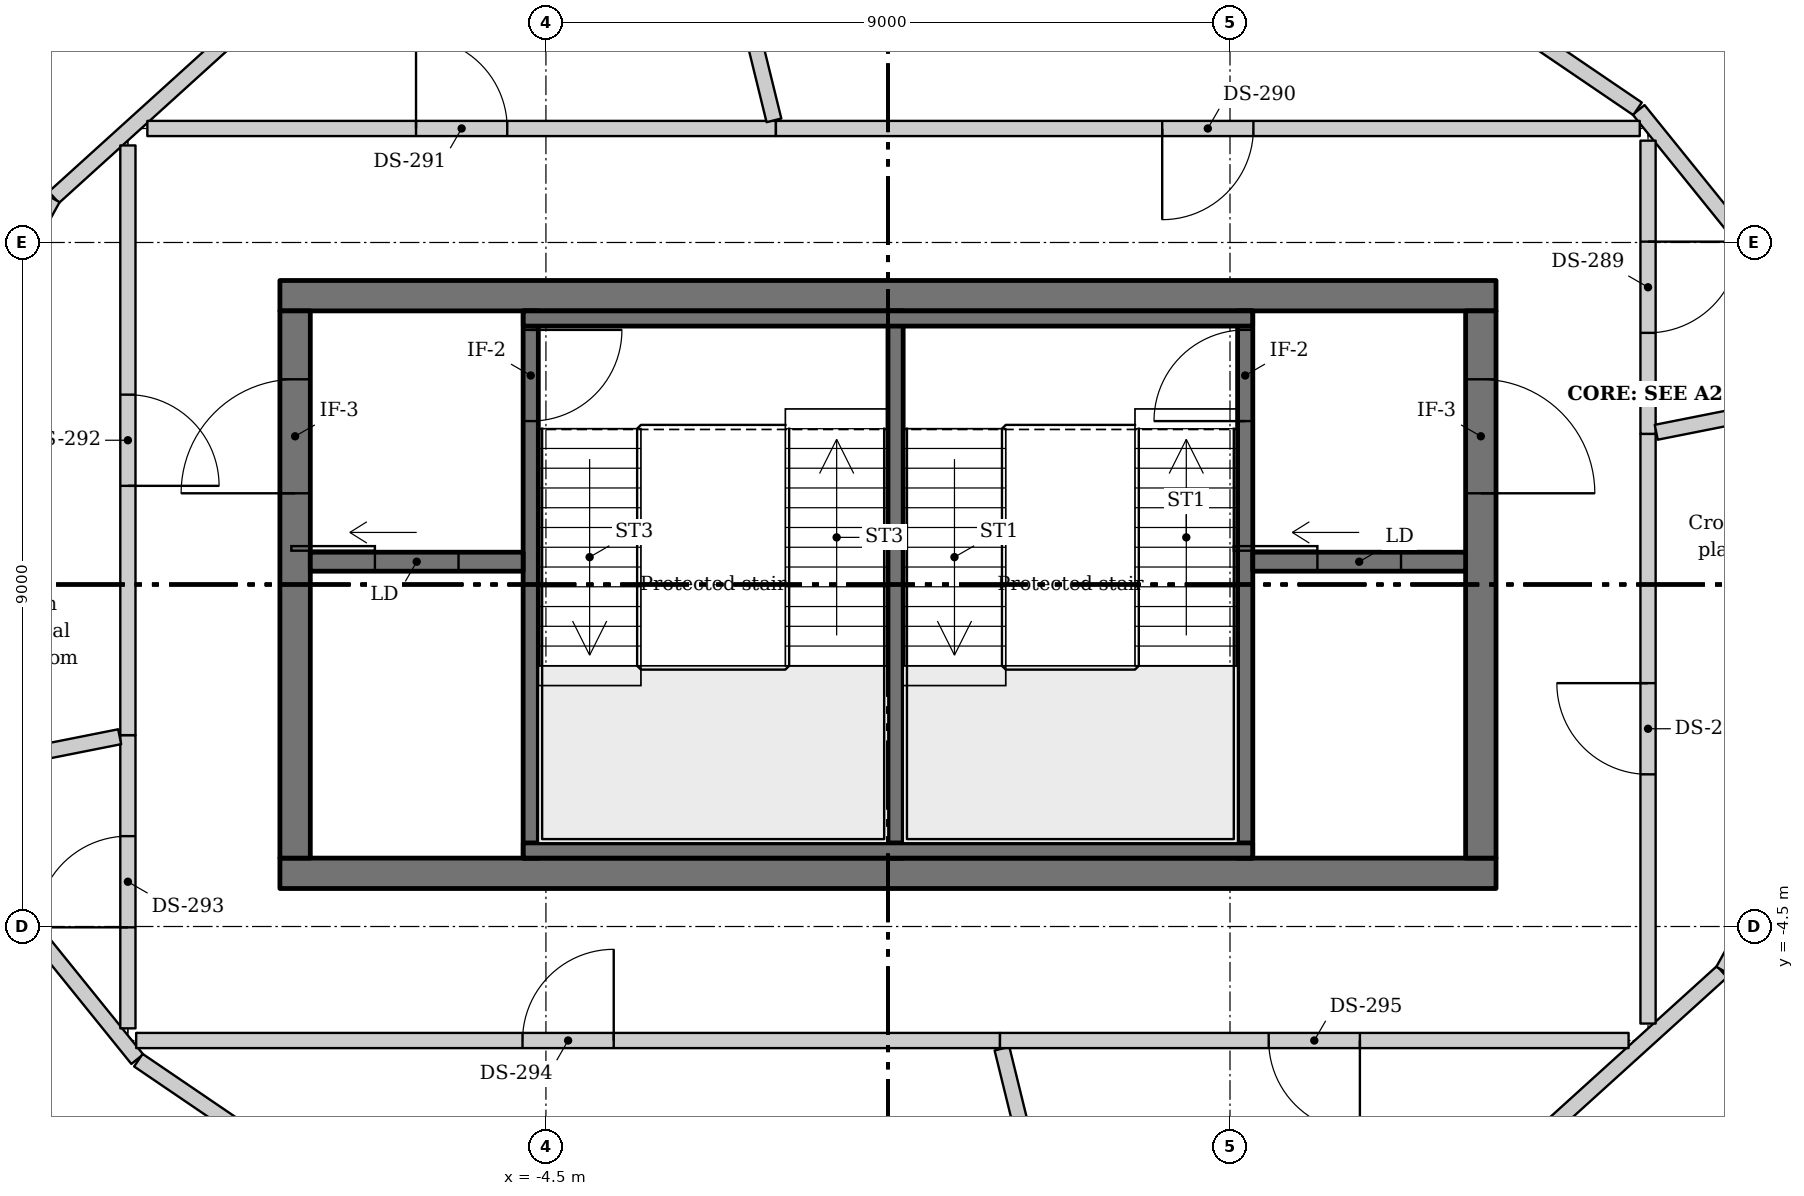
"""IFC4 building model, lengths in metres.
Left out: names, types, materials, properties, quantities, classifications, styles, units other than length and angle.
Written with IfcOpenShell. Run it as: python <this file> out.ifc"""

import sys

from ifc_helpers import new_model, si_unit, direction, frame, frame_2d, origin, place, context, subcontext, project, spatial, rectangle, extrude, source, transform, mapped, element, fill, save


model = new_model("IFC4")
c1 = context("Model", 3, precision=1e-05, world=origin(), true_north=direction((0.0, 1.0)))
c2 = subcontext(c1, "Body", "Model", "MODEL_VIEW")
j1 = project(units=[si_unit("LENGTHUNIT", "METRE"), si_unit("PLANEANGLEUNIT", "RADIAN")], contexts=[c1])
p1 = place(None, origin())
s1 = spatial("IfcSite", under=j1, at=p1, CompositionType="ELEMENT")
p2 = place(p1, origin())
s2 = spatial("IfcBuilding", under=s1, at=p2, CompositionType="ELEMENT")
p3 = place(p2, frame((0.0, 0.0, 365.5)))
s3 = spatial("IfcBuildingStorey", under=s2, at=p3, CompositionType="ELEMENT", Elevation=365.5)
m1 = source(origin(), c2, "Body", "SweptSolid", [
    extrude(rectangle(XDim=16.0, YDim=0.4, at=frame_2d((8.0, 0.0))), origin(), (0.0, 0.0, 1.0), 4.5),
])
for number, where, z_axis, x_axis in (
    (1, (-8.0, 3.8, -0.25), (0.0, 0.0, 1.0), (1.0, 0.0, 0.0)),
    (2, (-8.0, -3.8, -0.25), (0.0, 0.0, 1.0), (1.0, 0.0, 0.0)),
):
    element("IfcWall", number, at=place(p3, frame(where, z_axis=z_axis, x_axis=x_axis)), inside=s3, PredefinedType="SHEAR", context=c2, shape_type="MappedRepresentation", body=[
        mapped(m1, transform((0.0, 0.0, 0.0))),
    ])
m2 = source(origin(), c2, "Body", "SweptSolid", [
    extrude(rectangle(XDim=7.2, YDim=0.4, at=frame_2d((3.6, 0.0))), origin(), (0.0, 0.0, 1.0), 4.5),
])
p4 = place(p3, frame((7.8, -3.6, -0.25), z_axis=(0.0, 0.0, 1.0), x_axis=(0.0, 1.0, 0.0)))
e3 = element("IfcWall", 3, at=p4, inside=s3, PredefinedType="SHEAR", context=c2, shape_type="MappedRepresentation", body=[
    mapped(m2, transform((0.0, 0.0, 0.0))),
])
m3 = source(origin(), c2, "Body", "SweptSolid", [
    extrude(rectangle(XDim=1.5, YDim=2.1, at=frame_2d((0.75, 1.05))), frame((0.0, 0.21, 0.0), z_axis=(0.0, -1.0, 0.0), x_axis=(1.0, 0.0, 0.0)), (0.0, 0.0, 1.0), 0.42),
])
p5 = place(p4, frame((4.8, 0.0, 0.25)))
e4 = element("IfcOpeningElement", 4, at=p5, cuts=e3, PredefinedType="OPENING", context=c2, shape_type="MappedRepresentation", body=[
    mapped(m3, transform((0.0, 0.0, 0.0))),
])
p6 = place(p3, frame((-7.8, -3.6, -0.25), z_axis=(0.0, 0.0, 1.0), x_axis=(0.0, 1.0, 0.0)))
e5 = element("IfcWall", 5, at=p6, inside=s3, PredefinedType="SHEAR", context=c2, shape_type="MappedRepresentation", body=[
    mapped(m2, transform((0.0, 0.0, 0.0))),
])
p7 = place(p6, frame((4.8, 0.0, 0.25)))
e6 = element("IfcOpeningElement", 6, at=p7, cuts=e5, PredefinedType="OPENING", context=c2, shape_type="MappedRepresentation", body=[
    mapped(m3, transform((0.0, 0.0, 0.0))),
])
m4 = source(origin(), c2, "Body", "SweptSolid", [
    extrude(rectangle(XDim=3.175, YDim=0.2, at=frame_2d((1.587, 0.0))), origin(), (0.0, 0.0, 1.0), 4.25),
])
p8 = place(p3, frame((9.876, 6.246, 0.0), z_axis=(0.0, 0.0, 1.0), x_axis=(0.628308465475, -0.777964312943, 0.0)))
e7 = element("IfcWall", 7, at=p8, inside=s3, PredefinedType="SOLIDWALL", context=c2, shape_type="MappedRepresentation", body=[
    mapped(m4, transform((0.0, 0.0, 0.0))),
])
m5 = source(origin(), c2, "Body", "SweptSolid", [
    extrude(rectangle(XDim=3.23, YDim=0.2, at=frame_2d((1.615, 0.0))), origin(), (0.0, 0.0, 1.0), 4.25),
])
p9 = place(p3, frame((7.191, 8.076, 0.0), z_axis=(0.0, 0.0, 1.0), x_axis=(0.826887140507, -0.562367901701, 0.0)))
e8 = element("IfcWall", 8, at=p9, inside=s3, PredefinedType="SOLIDWALL", context=c2, shape_type="MappedRepresentation", body=[
    mapped(m5, transform((0.0, 0.0, 0.0))),
])
m6 = source(origin(), c2, "Body", "SweptSolid", [
    extrude(rectangle(XDim=3.205, YDim=0.2, at=frame_2d((1.603, 0.0))), origin(), (0.0, 0.0, 1.0), 4.25),
])
p10 = place(p3, frame((-10.974, 5.094, 0.0), z_axis=(0.0, 0.0, 1.0), x_axis=(0.741131432131, 0.671359963289, 0.0)))
e9 = element("IfcWall", 9, at=p10, inside=s3, PredefinedType="SOLIDWALL", context=c2, shape_type="MappedRepresentation", body=[
    mapped(m6, transform((0.0, 0.0, 0.0))),
])
m7 = source(origin(), c2, "Body", "SweptSolid", [
    extrude(rectangle(XDim=3.142, YDim=0.2, at=frame_2d((1.571, 0.0))), origin(), (0.0, 0.0, 1.0), 4.25),
])
p11 = place(p3, frame((-12.506, 2.329, 0.0), z_axis=(0.0, 0.0, 1.0), x_axis=(0.48375502956, 0.875203445706, 0.0)))
e10 = element("IfcWall", 10, at=p11, inside=s3, PredefinedType="SOLIDWALL", context=c2, shape_type="MappedRepresentation", body=[
    mapped(m7, transform((0.0, 0.0, 0.0))),
])
p12 = place(p3, frame((-9.876, -6.246, 0.0), z_axis=(0.0, 0.0, 1.0), x_axis=(-0.628308465475, 0.777964312943, 0.0)))
e11 = element("IfcWall", 11, at=p12, inside=s3, PredefinedType="SOLIDWALL", context=c2, shape_type="MappedRepresentation", body=[
    mapped(m4, transform((0.0, 0.0, 0.0))),
])
p13 = place(p3, frame((-7.191, -8.076, 0.0), z_axis=(0.0, 0.0, 1.0), x_axis=(-0.826887140507, 0.562367901701, 0.0)))
e12 = element("IfcWall", 12, at=p13, inside=s3, PredefinedType="SOLIDWALL", context=c2, shape_type="MappedRepresentation", body=[
    mapped(m5, transform((0.0, 0.0, 0.0))),
])
p14 = place(p3, frame((10.974, -5.094, 0.0), z_axis=(0.0, 0.0, 1.0), x_axis=(-0.741131432131, -0.671359963289, 0.0)))
e13 = element("IfcWall", 13, at=p14, inside=s3, PredefinedType="SOLIDWALL", context=c2, shape_type="MappedRepresentation", body=[
    mapped(m6, transform((0.0, 0.0, 0.0))),
])
p15 = place(p3, frame((12.506, -2.329, 0.0), z_axis=(0.0, 0.0, 1.0), x_axis=(-0.48375502956, -0.875203445706, 0.0)))
e14 = element("IfcWall", 14, at=p15, inside=s3, PredefinedType="SOLIDWALL", context=c2, shape_type="MappedRepresentation", body=[
    mapped(m7, transform((0.0, 0.0, 0.0))),
])
m8 = source(origin(), c2, "Body", "SweptSolid", [
    extrude(rectangle(XDim=7.2, YDim=0.2, at=frame_2d((3.6, 0.0))), origin(), (0.0, 0.0, 1.0), 4.25),
])
p16 = place(p3, frame((0.1, 3.6, 0.0), z_axis=(0.0, 0.0, 1.0), x_axis=(0.0, -1.0, 0.0)))
e15 = element("IfcWall", 15, at=p16, inside=s3, PredefinedType="SHEAR", context=c2, shape_type="MappedRepresentation", body=[
    mapped(m8, transform((0.0, 0.0, 0.0))),
])
p17 = place(p3, frame((4.7, -3.6, 0.0), z_axis=(0.0, 0.0, 1.0), x_axis=(0.0, 1.0, 0.0)))
e16 = element("IfcWall", 16, at=p17, inside=s3, PredefinedType="SHEAR", context=c2, shape_type="MappedRepresentation", body=[
    mapped(m8, transform((0.0, 0.0, 0.0))),
])
m9 = source(origin(), c2, "Body", "SweptSolid", [
    extrude(rectangle(XDim=1.2, YDim=2.1, at=frame_2d((0.6, 1.05))), frame((0.0, 0.11, 0.0), z_axis=(0.0, -1.0, 0.0), x_axis=(1.0, 0.0, 0.0)), (0.0, 0.0, 1.0), 0.22),
])
p18 = place(p17, frame((5.75, 0.0, 0.0)))
e17 = element("IfcOpeningElement", 17, at=p18, cuts=e16, PredefinedType="OPENING", context=c2, shape_type="MappedRepresentation", body=[
    mapped(m9, transform((0.0, 0.0, 0.0))),
])
p19 = place(p3, frame((-4.7, 3.6, 0.0), z_axis=(0.0, 0.0, 1.0), x_axis=(0.0, -1.0, 0.0)))
e18 = element("IfcWall", 18, at=p19, inside=s3, PredefinedType="SHEAR", context=c2, shape_type="MappedRepresentation", body=[
    mapped(m8, transform((0.0, 0.0, 0.0))),
])
p20 = place(p19, frame((0.25, 0.0, 0.0)))
e19 = element("IfcOpeningElement", 19, at=p20, cuts=e18, PredefinedType="OPENING", context=c2, shape_type="MappedRepresentation", body=[
    mapped(m9, transform((0.0, 0.0, 0.0))),
])
m10 = source(origin(), c2, "Body", "SweptSolid", [
    extrude(rectangle(XDim=2.8, YDim=0.25, at=frame_2d((1.4, 0.0))), origin(), (0.0, 0.0, 1.0), 4.25),
])
p21 = place(p3, frame((7.6, 0.3, 0.0), z_axis=(0.0, 0.0, 1.0), x_axis=(-1.0, 0.0, 0.0)))
e20 = element("IfcWall", 20, at=p21, inside=s3, PredefinedType="SHEAR", context=c2, shape_type="MappedRepresentation", body=[
    mapped(m10, transform((0.0, 0.0, 0.0))),
])
m11 = source(origin(), c2, "Body", "SweptSolid", [
    extrude(rectangle(XDim=1.1, YDim=2.1, at=frame_2d((0.55, 1.05))), frame((0.0, 0.135, 0.0), z_axis=(0.0, -1.0, 0.0), x_axis=(1.0, 0.0, 0.0)), (0.0, 0.0, 1.0), 0.27),
])
p22 = place(p21, frame((0.85, 0.0, 0.0)))
e21 = element("IfcOpeningElement", 21, at=p22, cuts=e20, PredefinedType="OPENING", context=c2, shape_type="MappedRepresentation", body=[
    mapped(m11, transform((0.0, 0.0, 0.0))),
])
p23 = place(p3, frame((-4.8, 0.3, 0.0), z_axis=(0.0, 0.0, 1.0), x_axis=(-1.0, 0.0, 0.0)))
e22 = element("IfcWall", 22, at=p23, inside=s3, PredefinedType="SHEAR", context=c2, shape_type="MappedRepresentation", body=[
    mapped(m10, transform((0.0, 0.0, 0.0))),
])
p24 = place(p23, frame((0.85, 0.0, 0.0)))
e23 = element("IfcOpeningElement", 23, at=p24, cuts=e22, PredefinedType="OPENING", context=c2, shape_type="MappedRepresentation", body=[
    mapped(m11, transform((0.0, 0.0, 0.0))),
])
m12 = source(origin(), c2, "Body", "SweptSolid", [
    extrude(rectangle(XDim=9.596, YDim=0.2, at=frame_2d((4.798, 0.0))), origin(), (0.0, 0.0, 1.0), 4.25),
])
for number, where, z_axis, x_axis in (
    (24, (-4.798, -3.5, 0.0), (0.0, 0.0, 1.0), (1.0, 0.0, 0.0)),
    (25, (4.798, 3.5, 0.0), (0.0, 0.0, 1.0), (-1.0, 0.0, 0.0)),
):
    element("IfcWall", number, at=place(p3, frame(where, z_axis=z_axis, x_axis=x_axis)), inside=s3, PredefinedType="SHEAR", context=c2, shape_type="MappedRepresentation", body=[
        mapped(m12, transform((0.0, 0.0, 0.0))),
    ])
m13 = source(origin(), c2, "Body", "SweptSolid", [
    extrude(rectangle(XDim=3.858, YDim=0.2, at=frame_2d((1.929, 0.0))), origin(), (0.0, 0.0, 1.0), 4.25),
])
p25 = place(p3, frame((-10.0, -5.84, 0.0), z_axis=(0.0, 0.0, 1.0), x_axis=(0.0, 1.0, 0.0)))
e26 = element("IfcWall", 26, at=p25, inside=s3, PredefinedType="PARTITIONING", context=c2, shape_type="MappedRepresentation", body=[
    mapped(m13, transform((0.0, 0.0, 0.0))),
])
p26 = place(p25, frame((1.329, 0.0, 0.0)))
e27 = element("IfcOpeningElement", 27, at=p26, cuts=e26, PredefinedType="OPENING", context=c2, shape_type="MappedRepresentation", body=[
    mapped(m9, transform((0.0, 0.0, 0.0))),
])
m14 = source(origin(), c2, "Body", "SweptSolid", [
    extrude(rectangle(XDim=2.141, YDim=0.2, at=frame_2d((1.071, 0.0))), origin(), (0.0, 0.0, 1.0), 4.25),
])
p27 = place(p3, frame((-10.108, -2.003, 0.0), z_axis=(0.0, 0.0, 1.0), x_axis=(-0.980851641364, -0.194756405888, 0.0)))
e28 = element("IfcWall", 28, at=p27, inside=s3, PredefinedType="PARTITIONING", context=c2, shape_type="MappedRepresentation", body=[
    mapped(m14, transform((0.0, 0.0, 0.0))),
])
m15 = source(origin(), c2, "Body", "SweptSolid", [
    extrude(rectangle(XDim=7.759, YDim=0.2, at=frame_2d((3.879, 0.0))), origin(), (0.0, 0.0, 1.0), 4.25),
])
p28 = place(p3, frame((-10.0, -1.982, 0.0), z_axis=(0.0, 0.0, 1.0), x_axis=(0.0, 1.0, 0.0)))
e29 = element("IfcWall", 29, at=p28, inside=s3, PredefinedType="PARTITIONING", context=c2, shape_type="MappedRepresentation", body=[
    mapped(m15, transform((0.0, 0.0, 0.0))),
])
p29 = place(p28, frame((3.28, 0.0, 0.0)))
e30 = element("IfcOpeningElement", 30, at=p29, cuts=e29, PredefinedType="OPENING", context=c2, shape_type="MappedRepresentation", body=[
    mapped(m9, transform((0.0, 0.0, 0.0))),
])
m16 = source(origin(), c2, "Body", "SweptSolid", [
    extrude(rectangle(XDim=8.27, YDim=0.2, at=frame_2d((4.135, 0.0))), origin(), (0.0, 0.0, 1.0), 4.25),
])
p30 = place(p3, frame((-9.744, 6.0, 0.0), z_axis=(0.0, 0.0, 1.0), x_axis=(1.0, 0.0, 0.0)))
e31 = element("IfcWall", 31, at=p30, inside=s3, PredefinedType="PARTITIONING", context=c2, shape_type="MappedRepresentation", body=[
    mapped(m16, transform((0.0, 0.0, 0.0))),
])
p31 = place(p30, frame((3.535, 0.0, 0.0)))
e32 = element("IfcOpeningElement", 32, at=p31, cuts=e31, PredefinedType="OPENING", context=c2, shape_type="MappedRepresentation", body=[
    mapped(m9, transform((0.0, 0.0, 0.0))),
])
m17 = source(origin(), c2, "Body", "SweptSolid", [
    extrude(rectangle(XDim=3.458, YDim=0.2, at=frame_2d((1.729, 0.0))), origin(), (0.0, 0.0, 1.0), 4.25),
])
p32 = place(p3, frame((-1.5, 6.107, 0.0), z_axis=(0.0, 0.0, 1.0), x_axis=(-0.238563284271, 0.971126953286, 0.0)))
e33 = element("IfcWall", 33, at=p32, inside=s3, PredefinedType="PARTITIONING", context=c2, shape_type="MappedRepresentation", body=[
    mapped(m17, transform((0.0, 0.0, 0.0))),
])
m18 = source(origin(), c2, "Body", "SweptSolid", [
    extrude(rectangle(XDim=11.365, YDim=0.2, at=frame_2d((5.683, 0.0))), origin(), (0.0, 0.0, 1.0), 4.25),
])
p33 = place(p3, frame((-1.474, 6.0, 0.0), z_axis=(0.0, 0.0, 1.0), x_axis=(1.0, 0.0, 0.0)))
e34 = element("IfcWall", 34, at=p33, inside=s3, PredefinedType="PARTITIONING", context=c2, shape_type="MappedRepresentation", body=[
    mapped(m18, transform((0.0, 0.0, 0.0))),
])
p34 = place(p33, frame((5.082, 0.0, 0.0)))
e35 = element("IfcOpeningElement", 35, at=p34, cuts=e34, PredefinedType="OPENING", context=c2, shape_type="MappedRepresentation", body=[
    mapped(m9, transform((0.0, 0.0, 0.0))),
])
p35 = place(p3, frame((1.474, -6.0, 0.0), z_axis=(0.0, 0.0, 1.0), x_axis=(-1.0, 0.0, 0.0)))
e36 = element("IfcWall", 36, at=p35, inside=s3, PredefinedType="PARTITIONING", context=c2, shape_type="MappedRepresentation", body=[
    mapped(m18, transform((0.0, 0.0, 0.0))),
])
p36 = place(p35, frame((5.082, 0.0, 0.0)))
e37 = element("IfcOpeningElement", 37, at=p36, cuts=e36, PredefinedType="OPENING", context=c2, shape_type="MappedRepresentation", body=[
    mapped(m9, transform((0.0, 0.0, 0.0))),
])
p37 = place(p3, frame((1.5, -6.107, 0.0), z_axis=(0.0, 0.0, 1.0), x_axis=(0.238563284271, -0.971126953286, 0.0)))
e38 = element("IfcWall", 38, at=p37, inside=s3, PredefinedType="PARTITIONING", context=c2, shape_type="MappedRepresentation", body=[
    mapped(m17, transform((0.0, 0.0, 0.0))),
])
p38 = place(p3, frame((9.744, -6.0, 0.0), z_axis=(0.0, 0.0, 1.0), x_axis=(-1.0, 0.0, 0.0)))
e39 = element("IfcWall", 39, at=p38, inside=s3, PredefinedType="PARTITIONING", context=c2, shape_type="MappedRepresentation", body=[
    mapped(m16, transform((0.0, 0.0, 0.0))),
])
p39 = place(p38, frame((3.535, 0.0, 0.0)))
e40 = element("IfcOpeningElement", 40, at=p39, cuts=e39, PredefinedType="OPENING", context=c2, shape_type="MappedRepresentation", body=[
    mapped(m9, transform((0.0, 0.0, 0.0))),
])
p40 = place(p3, frame((10.0, 1.982, 0.0), z_axis=(0.0, 0.0, 1.0), x_axis=(0.0, -1.0, 0.0)))
e41 = element("IfcWall", 41, at=p40, inside=s3, PredefinedType="PARTITIONING", context=c2, shape_type="MappedRepresentation", body=[
    mapped(m15, transform((0.0, 0.0, 0.0))),
])
p41 = place(p40, frame((3.28, 0.0, 0.0)))
e42 = element("IfcOpeningElement", 42, at=p41, cuts=e41, PredefinedType="OPENING", context=c2, shape_type="MappedRepresentation", body=[
    mapped(m9, transform((0.0, 0.0, 0.0))),
])
p42 = place(p3, frame((10.0, 5.84, 0.0), z_axis=(0.0, 0.0, 1.0), x_axis=(0.0, -1.0, 0.0)))
e43 = element("IfcWall", 43, at=p42, inside=s3, PredefinedType="PARTITIONING", context=c2, shape_type="MappedRepresentation", body=[
    mapped(m13, transform((0.0, 0.0, 0.0))),
])
p43 = place(p42, frame((1.329, 0.0, 0.0)))
e44 = element("IfcOpeningElement", 44, at=p43, cuts=e43, PredefinedType="OPENING", context=c2, shape_type="MappedRepresentation", body=[
    mapped(m9, transform((0.0, 0.0, 0.0))),
])
p44 = place(p3, frame((12.208, 2.42, 0.0), z_axis=(0.0, 0.0, 1.0), x_axis=(-0.980851641364, -0.194756405888, 0.0)))
e45 = element("IfcWall", 45, at=p44, inside=s3, PredefinedType="PARTITIONING", context=c2, shape_type="MappedRepresentation", body=[
    mapped(m14, transform((0.0, 0.0, 0.0))),
])
m19 = source(origin(), c2, "Body", "SweptSolid", [
    extrude(rectangle(XDim=1.1, YDim=2.1, at=frame_2d((0.55, 1.05))), frame((0.0, 0.025, 0.0), z_axis=(0.0, -1.0, 0.0), x_axis=(1.0, 0.0, 0.0)), (0.0, 0.0, 1.0), 0.05),
])
p45 = place(p22, origin())
e46 = element("IfcDoor", 46, at=p45, inside=s3, OperationType="SLIDING_TO_RIGHT", PredefinedType="DOOR", context=c2, shape_type="MappedRepresentation", body=[
    mapped(m19, transform((0.0, 0.0, 0.0))),
])
fill(e21, e46)
m20 = source(origin(), c2, "Body", "SweptSolid", [
    extrude(rectangle(XDim=1.2, YDim=2.1, at=frame_2d((0.6, 1.05))), frame((0.0, 0.025, 0.0), z_axis=(0.0, -1.0, 0.0), x_axis=(1.0, 0.0, 0.0)), (0.0, 0.0, 1.0), 0.05),
])
p46 = place(p18, origin())
e47 = element("IfcDoor", 47, at=p46, inside=s3, OperationType="SINGLE_SWING_RIGHT", PredefinedType="DOOR", context=c2, shape_type="MappedRepresentation", body=[
    mapped(m20, transform((0.0, 0.0, 0.0))),
])
fill(e17, e47)
p47 = place(p24, origin())
e48 = element("IfcDoor", 48, at=p47, inside=s3, OperationType="SLIDING_TO_RIGHT", PredefinedType="DOOR", context=c2, shape_type="MappedRepresentation", body=[
    mapped(m19, transform((0.0, 0.0, 0.0))),
])
fill(e23, e48)
p48 = place(p20, origin())
e49 = element("IfcDoor", 49, at=p48, inside=s3, OperationType="SINGLE_SWING_LEFT", PredefinedType="DOOR", context=c2, shape_type="MappedRepresentation", body=[
    mapped(m20, transform((0.0, 0.0, 0.0))),
])
fill(e19, e49)
m21 = source(origin(), c2, "Body", "SweptSolid", [
    extrude(rectangle(XDim=1.5, YDim=2.1, at=frame_2d((0.75, 1.05))), frame((0.0, 0.025, 0.0), z_axis=(0.0, -1.0, 0.0), x_axis=(1.0, 0.0, 0.0)), (0.0, 0.0, 1.0), 0.05),
])
p49 = place(p5, origin())
e50 = element("IfcDoor", 50, at=p49, inside=s3, OperationType="DOUBLE_DOOR_SINGLE_SWING", PredefinedType="DOOR", context=c2, shape_type="MappedRepresentation", body=[
    mapped(m21, transform((0.0, 0.0, 0.0))),
])
fill(e4, e50)
p50 = place(p7, origin())
e51 = element("IfcDoor", 51, at=p50, inside=s3, OperationType="DOUBLE_DOOR_SINGLE_SWING", PredefinedType="DOOR", context=c2, shape_type="MappedRepresentation", body=[
    mapped(m21, transform((0.0, 0.0, 0.0))),
])
fill(e6, e51)
m22 = source(origin(), c2, "Body", "SweptSolid", [
    extrude(rectangle(XDim=1.2, YDim=2.1, at=frame_2d((0.6, 1.05))), frame((0.0, 0.025, 0.0), z_axis=(0.0, -1.0, 0.0), x_axis=(1.0, 0.0, 0.0)), (0.0, 0.0, 1.0), 0.05),
])
p51 = place(p43, origin())
e52 = element("IfcDoor", 52, at=p51, inside=s3, OperationType="SINGLE_SWING_LEFT", PredefinedType="DOOR", context=c2, shape_type="MappedRepresentation", body=[
    mapped(m22, transform((0.0, 0.0, 0.0))),
])
fill(e44, e52)
p52 = place(p34, origin())
e53 = element("IfcDoor", 53, at=p52, inside=s3, OperationType="SINGLE_SWING_LEFT", PredefinedType="DOOR", context=c2, shape_type="MappedRepresentation", body=[
    mapped(m22, transform((0.0, 0.0, 0.0))),
])
fill(e35, e53)
p53 = place(p31, origin())
e54 = element("IfcDoor", 54, at=p53, inside=s3, OperationType="SINGLE_SWING_LEFT", PredefinedType="DOOR", context=c2, shape_type="MappedRepresentation", body=[
    mapped(m22, transform((0.0, 0.0, 0.0))),
])
fill(e32, e54)
p54 = place(p29, origin())
e55 = element("IfcDoor", 55, at=p54, inside=s3, OperationType="SINGLE_SWING_LEFT", PredefinedType="DOOR", context=c2, shape_type="MappedRepresentation", body=[
    mapped(m22, transform((0.0, 0.0, 0.0))),
])
fill(e30, e55)
p55 = place(p26, origin())
e56 = element("IfcDoor", 56, at=p55, inside=s3, OperationType="SINGLE_SWING_LEFT", PredefinedType="DOOR", context=c2, shape_type="MappedRepresentation", body=[
    mapped(m22, transform((0.0, 0.0, 0.0))),
])
fill(e27, e56)
p56 = place(p36, origin())
e57 = element("IfcDoor", 57, at=p56, inside=s3, OperationType="SINGLE_SWING_LEFT", PredefinedType="DOOR", context=c2, shape_type="MappedRepresentation", body=[
    mapped(m22, transform((0.0, 0.0, 0.0))),
])
fill(e37, e57)
p57 = place(p39, origin())
e58 = element("IfcDoor", 58, at=p57, inside=s3, OperationType="SINGLE_SWING_LEFT", PredefinedType="DOOR", context=c2, shape_type="MappedRepresentation", body=[
    mapped(m22, transform((0.0, 0.0, 0.0))),
])
fill(e40, e58)
p58 = place(p41, origin())
e59 = element("IfcDoor", 59, at=p58, inside=s3, OperationType="SINGLE_SWING_LEFT", PredefinedType="DOOR", context=c2, shape_type="MappedRepresentation", body=[
    mapped(m22, transform((0.0, 0.0, 0.0))),
])
fill(e42, e59)
save(model, sys.argv[1])
